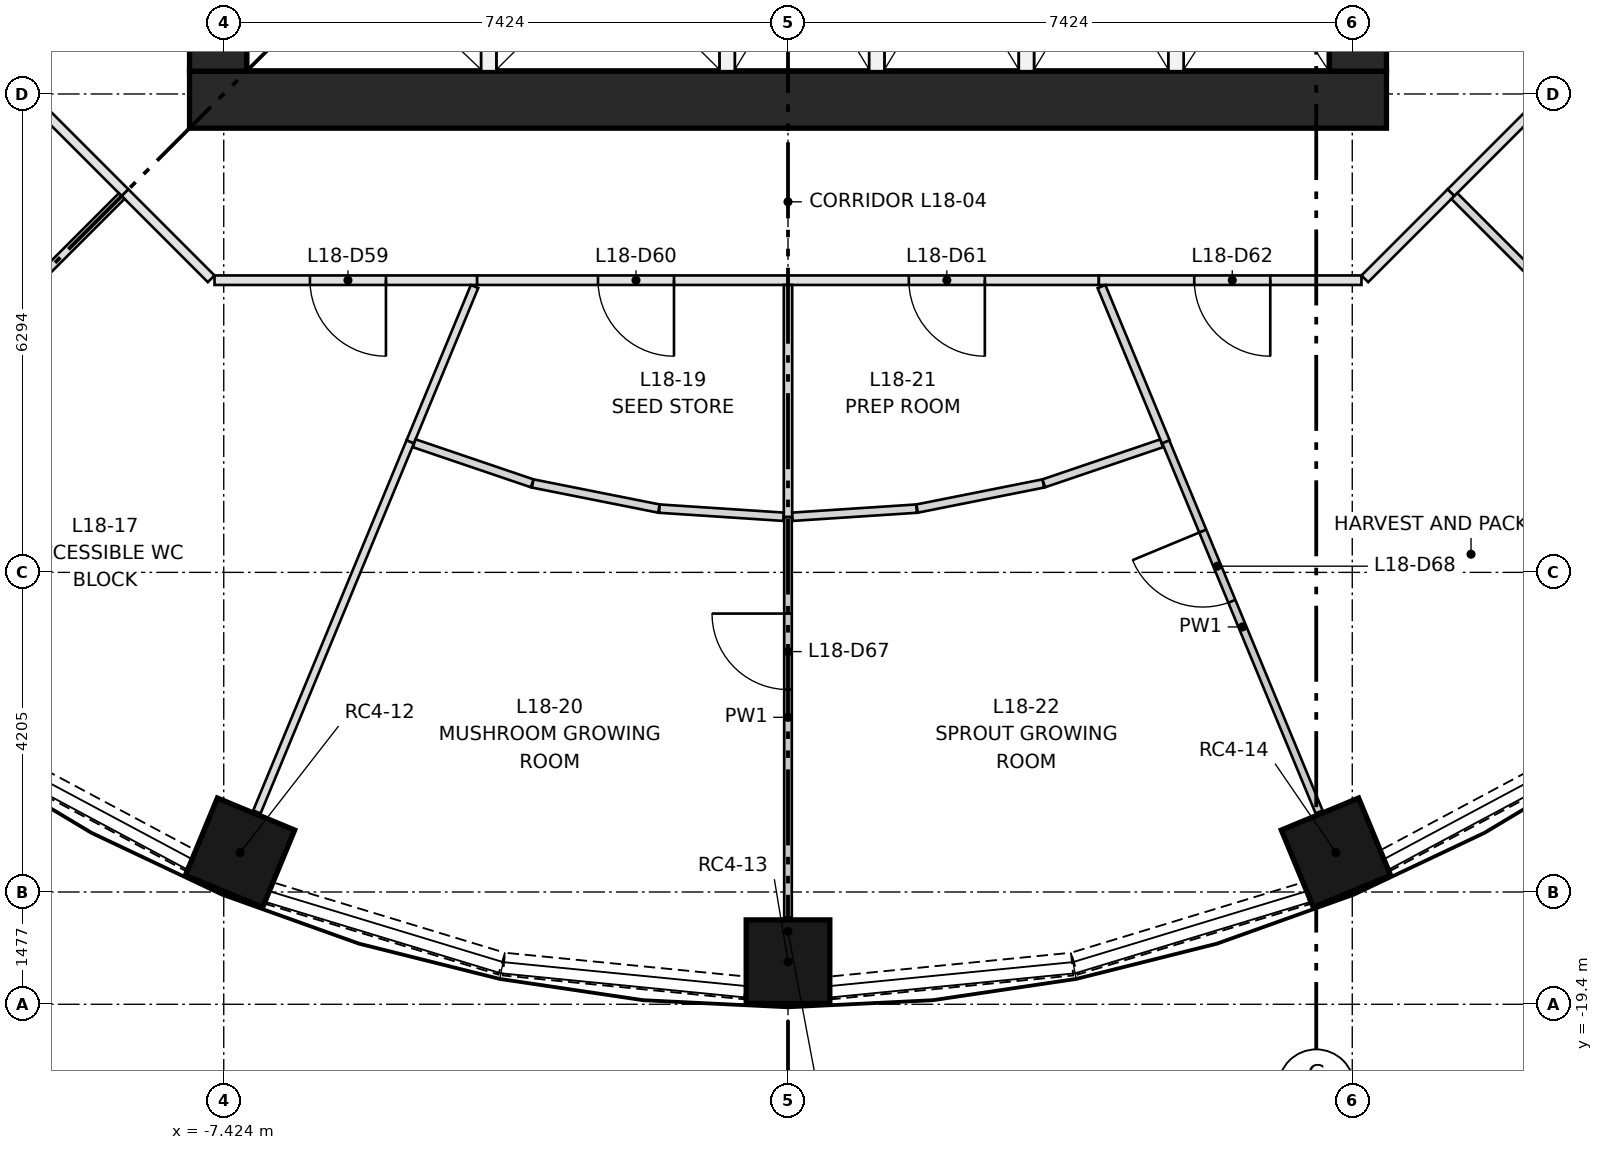
"""IFC4 building model, lengths in metres.
Left out: names, types, materials, properties, quantities, classifications, styles, units other than length and angle.
Written with IfcOpenShell. Run it as: python <this file> out.ifc"""

import sys

from ifc_helpers import new_model, si_unit, direction, frame, frame_2d, origin, origin_2d, place, context, subcontext, project, spatial, rectangle, extrude, element, fill, save


model = new_model("IFC4")
c1 = context("Model", 3, precision=1e-05, world=origin(), true_north=direction((0.0, 1.0)))
c2 = subcontext(c1, "Body", "Model", "MODEL_VIEW")
j1 = project(units=[si_unit("LENGTHUNIT", "METRE"), si_unit("PLANEANGLEUNIT", "RADIAN")], contexts=[c1])
p1 = place(None, origin())
s1 = spatial("IfcSite", under=j1, at=p1, CompositionType="ELEMENT")
p2 = place(p1, origin())
s2 = spatial("IfcBuilding", under=s1, at=p2, CompositionType="ELEMENT")
p3 = place(p2, frame((0.0, 0.0, 72.75)))
s3 = spatial("IfcBuildingStorey", under=s2, at=p3, CompositionType="ELEMENT", Elevation=72.75)
for number, where, z_axis, x_axis in (
    (1, (-7.21, -17.406, 0.0), (0.0, 0.0, 1.0), (-0.383, -0.924, 0.0)),
    (2, (0.0, -18.84, 0.0), (0.0, 0.0, 1.0), (0.0, -1.0, 0.0)),
    (3, (7.21, -17.406, 0.0), (0.0, 0.0, 1.0), (0.383, -0.924, 0.0)),
):
    element("IfcColumn", number, at=place(p3, frame(where, z_axis=z_axis, x_axis=x_axis)), inside=s3, PredefinedType="COLUMN", context=c2, shape_type="SweptSolid", body=[
        extrude(rectangle(XDim=1.1, YDim=1.1, at=origin_2d()), origin(), (0.0, 0.0, 1.0), 3.65),
    ])
p4 = place(p3, frame((-7.874, -7.499, 0.0), z_axis=(0.0, 0.0, 1.0), x_axis=(1.0, 0.0, 0.0)))
e4 = element("IfcWall", 4, at=p4, inside=s3, PredefinedType="SHEAR", context=c2, shape_type="SweptSolid", body=[
    extrude(rectangle(XDim=15.748, YDim=0.75, at=frame_2d((7.874, 0.0))), origin(), (0.0, 0.0, 1.0), 3.65),
])
p5 = place(p3, frame((-7.499, -7.124, 0.0), z_axis=(0.0, 0.0, 1.0), x_axis=(0.0, 1.0, 0.0)))
e5 = element("IfcWall", 5, at=p5, inside=s3, PredefinedType="SHEAR", context=c2, shape_type="SweptSolid", body=[
    extrude(rectangle(XDim=14.248, YDim=0.75, at=frame_2d((7.124, 0.0))), origin(), (0.0, 0.0, 1.0), 3.65),
])
p6 = place(p5, frame((6.624, 0.0, 0.0)))
e6 = element("IfcOpeningElement", 6, at=p6, cuts=e5, PredefinedType="OPENING", context=c2, shape_type="SweptSolid", body=[
    extrude(rectangle(XDim=1.0, YDim=2.1, at=frame_2d((0.5, 1.05))), frame((0.0, 0.385, 0.0), z_axis=(0.0, -1.0, 0.0), x_axis=(1.0, 0.0, 0.0)), (0.0, 0.0, 1.0), 0.77),
])
p7 = place(p5, frame((3.5, 0.0, 0.0)))
e7 = element("IfcOpeningElement", 7, at=p7, cuts=e5, PredefinedType="OPENING", context=c2, shape_type="SweptSolid", body=[
    extrude(rectangle(XDim=1.8, YDim=2.1, at=frame_2d((0.9, 1.05))), frame((0.0, 0.385, 0.0), z_axis=(0.0, -1.0, 0.0), x_axis=(1.0, 0.0, 0.0)), (0.0, 0.0, 1.0), 0.77),
])
p8 = place(p5, frame((8.948, 0.0, 0.0)))
e8 = element("IfcOpeningElement", 8, at=p8, cuts=e5, PredefinedType="OPENING", context=c2, shape_type="SweptSolid", body=[
    extrude(rectangle(XDim=1.8, YDim=2.1, at=frame_2d((0.9, 1.05))), frame((0.0, 0.385, 0.0), z_axis=(0.0, -1.0, 0.0), x_axis=(1.0, 0.0, 0.0)), (0.0, 0.0, 1.0), 0.77),
])
p9 = place(p5, frame((12.124, 0.0, 0.0)))
e9 = element("IfcOpeningElement", 9, at=p9, cuts=e5, PredefinedType="OPENING", context=c2, shape_type="SweptSolid", body=[
    extrude(rectangle(XDim=1.0, YDim=2.1, at=frame_2d((0.5, 1.05))), frame((0.0, 0.385, 0.0), z_axis=(0.0, -1.0, 0.0), x_axis=(1.0, 0.0, 0.0)), (0.0, 0.0, 1.0), 0.77),
])
p10 = place(p3, frame((7.499, -7.124, 0.0), z_axis=(0.0, 0.0, 1.0), x_axis=(0.0, 1.0, 0.0)))
e10 = element("IfcWall", 10, at=p10, inside=s3, PredefinedType="SHEAR", context=c2, shape_type="SweptSolid", body=[
    extrude(rectangle(XDim=14.248, YDim=0.75, at=frame_2d((7.124, 0.0))), origin(), (0.0, 0.0, 1.0), 3.65),
])
p11 = place(p10, frame((6.624, 0.0, 0.0)))
e11 = element("IfcOpeningElement", 11, at=p11, cuts=e10, PredefinedType="OPENING", context=c2, shape_type="SweptSolid", body=[
    extrude(rectangle(XDim=1.0, YDim=2.1, at=frame_2d((0.5, 1.05))), frame((0.0, 0.385, 0.0), z_axis=(0.0, -1.0, 0.0), x_axis=(1.0, 0.0, 0.0)), (0.0, 0.0, 1.0), 0.77),
])
p12 = place(p10, frame((3.5, 0.0, 0.0)))
e12 = element("IfcOpeningElement", 12, at=p12, cuts=e10, PredefinedType="OPENING", context=c2, shape_type="SweptSolid", body=[
    extrude(rectangle(XDim=1.8, YDim=2.1, at=frame_2d((0.9, 1.05))), frame((0.0, 0.385, 0.0), z_axis=(0.0, -1.0, 0.0), x_axis=(1.0, 0.0, 0.0)), (0.0, 0.0, 1.0), 0.77),
])
p13 = place(p10, frame((8.948, 0.0, 0.0)))
e13 = element("IfcOpeningElement", 13, at=p13, cuts=e10, PredefinedType="OPENING", context=c2, shape_type="SweptSolid", body=[
    extrude(rectangle(XDim=1.8, YDim=2.1, at=frame_2d((0.9, 1.05))), frame((0.0, 0.385, 0.0), z_axis=(0.0, -1.0, 0.0), x_axis=(1.0, 0.0, 0.0)), (0.0, 0.0, 1.0), 0.77),
])
for number, where, z_axis, x_axis in (
    (14, (-3.937, -7.124, 0.0), (0.0, 0.0, 1.0), (0.0, 1.0, 0.0)),
    (15, (-0.8, -7.124, 0.0), (0.0, 0.0, 1.0), (0.0, 1.0, 0.0)),
    (16, (1.168, -7.124, 0.0), (0.0, 0.0, 1.0), (0.0, 1.0, 0.0)),
    (17, (3.137, -7.124, 0.0), (0.0, 0.0, 1.0), (0.0, 1.0, 0.0)),
    (18, (5.105, -7.124, 0.0), (0.0, 0.0, 1.0), (0.0, 1.0, 0.0)),
):
    element("IfcWall", number, at=place(p3, frame(where, z_axis=z_axis, x_axis=x_axis)), inside=s3, PredefinedType="PARTITIONING", context=c2, shape_type="SweptSolid", body=[
        extrude(rectangle(XDim=2.95, YDim=0.2, at=frame_2d((1.475, 0.0))), origin(), (0.0, 0.0, 1.0), 3.3),
    ])
p14 = place(p3, frame((-10.676, -16.004, 0.0), z_axis=(0.0, 0.0, 1.0), x_axis=(0.8819437364, -0.471354692163, 0.0)))
e19 = element("IfcWall", 19, at=p14, inside=s3, PredefinedType="SOLIDWALL", context=c2, shape_type="SweptSolid", body=[
    extrude(rectangle(XDim=3.19, YDim=0.3, at=frame_2d((1.595, 0.0))), origin(), (0.0, 0.0, 1.0), 0.9),
])
p15 = place(p3, frame((-6.821, -17.939, 0.0), z_axis=(0.0, 0.0, 1.0), x_axis=(0.956954228099, -0.290238876314, 0.0)))
e20 = element("IfcWall", 20, at=p15, inside=s3, PredefinedType="SOLIDWALL", context=c2, shape_type="SweptSolid", body=[
    extrude(rectangle(XDim=3.191, YDim=0.3, at=frame_2d((1.595, 0.0))), origin(), (0.0, 0.0, 1.0), 0.9),
])
for number, where, z_axis, x_axis in (
    (21, (-3.738, -18.872, 0.0), (0.0, 0.0, 1.0), (0.995, -0.098, 0.0)),
    (22, (0.564, -19.185, 0.0), (0.0, 0.0, 1.0), (0.995, 0.098, 0.0)),
):
    element("IfcWall", number, at=place(p3, frame(where, z_axis=z_axis, x_axis=x_axis)), inside=s3, PredefinedType="SOLIDWALL", context=c2, shape_type="SweptSolid", body=[
        extrude(rectangle(XDim=3.189, YDim=0.3, at=frame_2d((1.595, 0.0))), origin(), (0.0, 0.0, 1.0), 0.9),
    ])
p16 = place(p3, frame((3.767, -18.865, 0.0), z_axis=(0.0, 0.0, 1.0), x_axis=(0.956954228099, 0.290238876314, 0.0)))
e23 = element("IfcWall", 23, at=p16, inside=s3, PredefinedType="SOLIDWALL", context=c2, shape_type="SweptSolid", body=[
    extrude(rectangle(XDim=3.191, YDim=0.3, at=frame_2d((1.595, 0.0))), origin(), (0.0, 0.0, 1.0), 0.9),
])
p17 = place(p3, frame((7.862, -17.508, 0.0), z_axis=(0.0, 0.0, 1.0), x_axis=(0.8819437364, 0.471354692163, 0.0)))
e24 = element("IfcWall", 24, at=p17, inside=s3, PredefinedType="SOLIDWALL", context=c2, shape_type="SweptSolid", body=[
    extrude(rectangle(XDim=3.19, YDim=0.3, at=frame_2d((1.595, 0.0))), origin(), (0.0, 0.0, 1.0), 0.9),
])
for number, where, z_axis, x_axis in (
    (25, (9.856, -7.589, 0.0), (0.0, 0.0, 1.0), (-0.707, -0.707, 0.0)),
    (26, (-8.722, -8.722, 0.0), (0.0, 0.0, 1.0), (-0.707, 0.707, 0.0)),
    (27, (-7.589, -9.856, 0.0), (0.0, 0.0, 1.0), (-0.707, 0.707, 0.0)),
):
    element("IfcWall", number, at=place(p3, frame(where, z_axis=z_axis, x_axis=x_axis)), inside=s3, PredefinedType="PARTITIONING", context=c2, shape_type="SweptSolid", body=[
        extrude(rectangle(XDim=1.603, YDim=0.125, at=frame_2d((0.801, 0.0))), origin(), (0.0, 0.0, 1.0), 3.3),
    ])
p18 = place(p3, frame((-4.09, -9.874, 0.0), z_axis=(0.0, 0.0, 1.0), x_axis=(-1.0, 0.0, 0.0)))
e28 = element("IfcWall", 28, at=p18, inside=s3, PredefinedType="PARTITIONING", context=c2, shape_type="SweptSolid", body=[
    extrude(rectangle(XDim=3.455, YDim=0.125, at=frame_2d((1.728, 0.0))), origin(), (0.0, 0.0, 1.0), 3.3),
])
p19 = place(p18, frame((1.2, 0.0, 0.0)))
e29 = element("IfcOpeningElement", 29, at=p19, cuts=e28, PredefinedType="OPENING", context=c2, shape_type="SweptSolid", body=[
    extrude(rectangle(XDim=1.0, YDim=2.1, at=frame_2d((0.5, 1.05))), frame((0.0, 0.073, 0.0), z_axis=(0.0, -1.0, 0.0), x_axis=(1.0, 0.0, 0.0)), (0.0, 0.0, 1.0), 0.145),
])
p20 = place(p3, frame((0.0, -9.874, 0.0), z_axis=(0.0, 0.0, 1.0), x_axis=(-1.0, 0.0, 0.0)))
e30 = element("IfcWall", 30, at=p20, inside=s3, PredefinedType="PARTITIONING", context=c2, shape_type="SweptSolid", body=[
    extrude(rectangle(XDim=4.09, YDim=0.125, at=frame_2d((2.045, 0.0))), origin(), (0.0, 0.0, 1.0), 3.3),
])
p21 = place(p20, frame((1.5, 0.0, 0.0)))
e31 = element("IfcOpeningElement", 31, at=p21, cuts=e30, PredefinedType="OPENING", context=c2, shape_type="SweptSolid", body=[
    extrude(rectangle(XDim=1.0, YDim=2.1, at=frame_2d((0.5, 1.05))), frame((0.0, 0.073, 0.0), z_axis=(0.0, -1.0, 0.0), x_axis=(1.0, 0.0, 0.0)), (0.0, 0.0, 1.0), 0.145),
])
p22 = place(p3, frame((4.09, -9.874, 0.0), z_axis=(0.0, 0.0, 1.0), x_axis=(-1.0, 0.0, 0.0)))
e32 = element("IfcWall", 32, at=p22, inside=s3, PredefinedType="PARTITIONING", context=c2, shape_type="SweptSolid", body=[
    extrude(rectangle(XDim=4.09, YDim=0.125, at=frame_2d((2.045, 0.0))), origin(), (0.0, 0.0, 1.0), 3.3),
])
p23 = place(p22, frame((1.5, 0.0, 0.0)))
e33 = element("IfcOpeningElement", 33, at=p23, cuts=e32, PredefinedType="OPENING", context=c2, shape_type="SweptSolid", body=[
    extrude(rectangle(XDim=1.0, YDim=2.1, at=frame_2d((0.5, 1.05))), frame((0.0, 0.073, 0.0), z_axis=(0.0, -1.0, 0.0), x_axis=(1.0, 0.0, 0.0)), (0.0, 0.0, 1.0), 0.145),
])
p24 = place(p3, frame((7.545, -9.874, 0.0), z_axis=(0.0, 0.0, 1.0), x_axis=(-1.0, 0.0, 0.0)))
e34 = element("IfcWall", 34, at=p24, inside=s3, PredefinedType="PARTITIONING", context=c2, shape_type="SweptSolid", body=[
    extrude(rectangle(XDim=3.455, YDim=0.125, at=frame_2d((1.728, 0.0))), origin(), (0.0, 0.0, 1.0), 3.3),
])
p25 = place(p24, frame((1.2, 0.0, 0.0)))
e35 = element("IfcOpeningElement", 35, at=p25, cuts=e34, PredefinedType="OPENING", context=c2, shape_type="SweptSolid", body=[
    extrude(rectangle(XDim=1.0, YDim=2.1, at=frame_2d((0.5, 1.05))), frame((0.0, 0.073, 0.0), z_axis=(0.0, -1.0, 0.0), x_axis=(1.0, 0.0, 0.0)), (0.0, 0.0, 1.0), 0.145),
])
p26 = place(p3, frame((8.722, -8.722, 0.0), z_axis=(0.0, 0.0, 1.0), x_axis=(-0.707030604857, -0.70718294931, 0.0)))
e36 = element("IfcWall", 36, at=p26, inside=s3, PredefinedType="PARTITIONING", context=c2, shape_type="SweptSolid", body=[
    extrude(rectangle(XDim=1.603, YDim=0.125, at=frame_2d((0.801, 0.0))), origin(), (0.0, 0.0, 1.0), 3.3),
])
p27 = place(p3, frame((-12.912, -12.912, 0.0), z_axis=(0.0, 0.0, 1.0), x_axis=(0.707106781187, 0.707106781187, 0.0)))
e37 = element("IfcWall", 37, at=p27, inside=s3, PredefinedType="PARTITIONING", context=c2, shape_type="SweptSolid", body=[
    extrude(rectangle(XDim=5.862, YDim=0.105, at=frame_2d((2.931, 0.0))), origin(), (0.0, 0.0, 1.0), 3.3),
])
p28 = place(p3, frame((-4.124, -9.957, 0.0), z_axis=(0.0, 0.0, 1.0), x_axis=(-0.382679799248, -0.923881037389, 0.0)))
e38 = element("IfcWall", 38, at=p28, inside=s3, PredefinedType="PARTITIONING", context=c2, shape_type="SweptSolid", body=[
    extrude(rectangle(XDim=2.213, YDim=0.105, at=frame_2d((1.106, 0.0))), origin(), (0.0, 0.0, 1.0), 3.3),
])
p29 = place(p3, frame((-4.971, -12.001, 0.0), z_axis=(0.0, 0.0, 1.0), x_axis=(-0.382696833945, -0.923873981281, 0.0)))
e39 = element("IfcWall", 39, at=p29, inside=s3, PredefinedType="PARTITIONING", context=c2, shape_type="SweptSolid", body=[
    extrude(rectangle(XDim=5.27, YDim=0.105, at=frame_2d((2.635, 0.0))), origin(), (0.0, 0.0, 1.0), 3.3),
])
p30 = place(p3, frame((-3.365, -12.546, 0.0), z_axis=(0.0, 0.0, 1.0), x_axis=(-0.946941470356, 0.321406054267, 0.0)))
e40 = element("IfcWall", 40, at=p30, inside=s3, PredefinedType="PARTITIONING", context=c2, shape_type="SweptSolid", body=[
    extrude(rectangle(XDim=1.639, YDim=0.11, at=frame_2d((0.82, 0.0))), origin(), (0.0, 0.0, 1.0), 3.3),
])
p31 = place(p3, frame((-1.699, -12.878, 0.0), z_axis=(0.0, 0.0, 1.0), x_axis=(-0.98079097439, 0.19506169423, 0.0)))
e41 = element("IfcWall", 41, at=p31, inside=s3, PredefinedType="PARTITIONING", context=c2, shape_type="SweptSolid", body=[
    extrude(rectangle(XDim=1.692, YDim=0.11, at=frame_2d((0.846, 0.0))), origin(), (0.0, 0.0, 1.0), 3.3),
])
p32 = place(p3, frame((-0.059, -12.986, 0.0), z_axis=(0.0, 0.0, 1.0), x_axis=(-0.997863649312, 0.065330983318, 0.0)))
e42 = element("IfcWall", 42, at=p32, inside=s3, PredefinedType="PARTITIONING", context=c2, shape_type="SweptSolid", body=[
    extrude(rectangle(XDim=1.637, YDim=0.11, at=frame_2d((0.818, 0.0))), origin(), (0.0, 0.0, 1.0), 3.3),
])
p33 = place(p3, frame((0.0, -9.937, 0.0), z_axis=(0.0, 0.0, 1.0), x_axis=(0.0, -1.0, 0.0)))
e43 = element("IfcWall", 43, at=p33, inside=s3, PredefinedType="PARTITIONING", context=c2, shape_type="SweptSolid", body=[
    extrude(rectangle(XDim=3.053, YDim=0.11, at=frame_2d((1.527, 0.0))), origin(), (0.0, 0.0, 1.0), 3.3),
])
p34 = place(p3, frame((0.0, -18.26, 0.0), z_axis=(0.0, 0.0, 1.0), x_axis=(0.0, 1.0, 0.0)))
e44 = element("IfcWall", 44, at=p34, inside=s3, PredefinedType="PARTITIONING", context=c2, shape_type="SweptSolid", body=[
    extrude(rectangle(XDim=5.27, YDim=0.1, at=frame_2d((2.635, 0.0))), origin(), (0.0, 0.0, 1.0), 3.3),
])
p35 = place(p34, frame((3.0, 0.0, 0.0)))
e45 = element("IfcOpeningElement", 45, at=p35, cuts=e44, PredefinedType="OPENING", context=c2, shape_type="SweptSolid", body=[
    extrude(rectangle(XDim=1.0, YDim=2.1, at=frame_2d((0.5, 1.05))), frame((0.0, 0.06, 0.0), z_axis=(0.0, -1.0, 0.0), x_axis=(1.0, 0.0, 0.0)), (0.0, 0.0, 1.0), 0.12),
])
p36 = place(p3, frame((1.692, -12.879, 0.0), z_axis=(0.0, 0.0, 1.0), x_axis=(-0.997863649312, -0.065330983318, 0.0)))
e46 = element("IfcWall", 46, at=p36, inside=s3, PredefinedType="PARTITIONING", context=c2, shape_type="SweptSolid", body=[
    extrude(rectangle(XDim=1.637, YDim=0.11, at=frame_2d((0.818, 0.0))), origin(), (0.0, 0.0, 1.0), 3.3),
])
p37 = place(p3, frame((3.359, -12.548, 0.0), z_axis=(0.0, 0.0, 1.0), x_axis=(-0.98079097439, -0.19506169423, 0.0)))
e47 = element("IfcWall", 47, at=p37, inside=s3, PredefinedType="PARTITIONING", context=c2, shape_type="SweptSolid", body=[
    extrude(rectangle(XDim=1.692, YDim=0.11, at=frame_2d((0.846, 0.0))), origin(), (0.0, 0.0, 1.0), 3.3),
])
p38 = place(p3, frame((4.915, -12.02, 0.0), z_axis=(0.0, 0.0, 1.0), x_axis=(-0.946923574546, -0.321458774913, 0.0)))
e48 = element("IfcWall", 48, at=p38, inside=s3, PredefinedType="PARTITIONING", context=c2, shape_type="SweptSolid", body=[
    extrude(rectangle(XDim=1.637, YDim=0.11, at=frame_2d((0.818, 0.0))), origin(), (0.0, 0.0, 1.0), 3.3),
])
p39 = place(p3, frame((4.125, -9.958, 0.0), z_axis=(0.0, 0.0, 1.0), x_axis=(0.382647470997, -0.923894427378, 0.0)))
e49 = element("IfcWall", 49, at=p39, inside=s3, PredefinedType="PARTITIONING", context=c2, shape_type="SweptSolid", body=[
    extrude(rectangle(XDim=2.212, YDim=0.11, at=frame_2d((1.106, 0.0))), origin(), (0.0, 0.0, 1.0), 3.3),
])
p40 = place(p3, frame((6.988, -16.87, 0.0), z_axis=(0.0, 0.0, 1.0), x_axis=(-0.382657291887, 0.923890359819, 0.0)))
e50 = element("IfcWall", 50, at=p40, inside=s3, PredefinedType="PARTITIONING", context=c2, shape_type="SweptSolid", body=[
    extrude(rectangle(XDim=5.27, YDim=0.1, at=frame_2d((2.635, 0.0))), origin(), (0.0, 0.0, 1.0), 3.3),
])
p41 = place(p40, frame((3.0, 0.0, 0.0)))
e51 = element("IfcOpeningElement", 51, at=p41, cuts=e50, PredefinedType="OPENING", context=c2, shape_type="SweptSolid", body=[
    extrude(rectangle(XDim=1.0, YDim=2.1, at=frame_2d((0.5, 1.05))), frame((0.0, 0.06, 0.0), z_axis=(0.0, -1.0, 0.0), x_axis=(1.0, 0.0, 0.0)), (0.0, 0.0, 1.0), 0.12),
])
p42 = place(p3, frame((8.767, -8.767, 0.0), z_axis=(0.0, 0.0, 1.0), x_axis=(0.707106781187, -0.707106781187, 0.0)))
e52 = element("IfcWall", 52, at=p42, inside=s3, PredefinedType="PARTITIONING", context=c2, shape_type="SweptSolid", body=[
    extrude(rectangle(XDim=5.862, YDim=0.11, at=frame_2d((2.931, 0.0))), origin(), (0.0, 0.0, 1.0), 3.3),
])
p43 = place(p19, origin())
e53 = element("IfcDoor", 53, at=p43, inside=s3, OperationType="SINGLE_SWING_LEFT", PredefinedType="DOOR", context=c2, shape_type="SweptSolid", body=[
    extrude(rectangle(XDim=1.0, YDim=2.1, at=frame_2d((0.5, 1.05))), frame((0.0, 0.025, 0.0), z_axis=(0.0, -1.0, 0.0), x_axis=(1.0, 0.0, 0.0)), (0.0, 0.0, 1.0), 0.05),
])
fill(e29, e53)
p44 = place(p21, origin())
e54 = element("IfcDoor", 54, at=p44, inside=s3, OperationType="SINGLE_SWING_LEFT", PredefinedType="DOOR", context=c2, shape_type="SweptSolid", body=[
    extrude(rectangle(XDim=1.0, YDim=2.1, at=frame_2d((0.5, 1.05))), frame((0.0, 0.025, 0.0), z_axis=(0.0, -1.0, 0.0), x_axis=(1.0, 0.0, 0.0)), (0.0, 0.0, 1.0), 0.05),
])
fill(e31, e54)
p45 = place(p23, origin())
e55 = element("IfcDoor", 55, at=p45, inside=s3, OperationType="SINGLE_SWING_LEFT", PredefinedType="DOOR", context=c2, shape_type="SweptSolid", body=[
    extrude(rectangle(XDim=1.0, YDim=2.1, at=frame_2d((0.5, 1.05))), frame((0.0, 0.025, 0.0), z_axis=(0.0, -1.0, 0.0), x_axis=(1.0, 0.0, 0.0)), (0.0, 0.0, 1.0), 0.05),
])
fill(e33, e55)
p46 = place(p25, origin())
e56 = element("IfcDoor", 56, at=p46, inside=s3, OperationType="SINGLE_SWING_LEFT", PredefinedType="DOOR", context=c2, shape_type="SweptSolid", body=[
    extrude(rectangle(XDim=1.0, YDim=2.1, at=frame_2d((0.5, 1.05))), frame((0.0, 0.025, 0.0), z_axis=(0.0, -1.0, 0.0), x_axis=(1.0, 0.0, 0.0)), (0.0, 0.0, 1.0), 0.05),
])
fill(e35, e56)
p47 = place(p35, origin())
e57 = element("IfcDoor", 57, at=p47, inside=s3, OperationType="SINGLE_SWING_RIGHT", PredefinedType="DOOR", context=c2, shape_type="SweptSolid", body=[
    extrude(rectangle(XDim=1.0, YDim=2.1, at=frame_2d((0.5, 1.05))), frame((0.0, 0.025, 0.0), z_axis=(0.0, -1.0, 0.0), x_axis=(1.0, 0.0, 0.0)), (0.0, 0.0, 1.0), 0.05),
])
fill(e45, e57)
p48 = place(p41, origin())
e58 = element("IfcDoor", 58, at=p48, inside=s3, OperationType="SINGLE_SWING_RIGHT", PredefinedType="DOOR", context=c2, shape_type="SweptSolid", body=[
    extrude(rectangle(XDim=1.0, YDim=2.1, at=frame_2d((0.5, 1.05))), frame((0.0, 0.025, 0.0), z_axis=(0.0, -1.0, 0.0), x_axis=(1.0, 0.0, 0.0)), (0.0, 0.0, 1.0), 0.05),
])
fill(e51, e58)
save(model, sys.argv[1])
